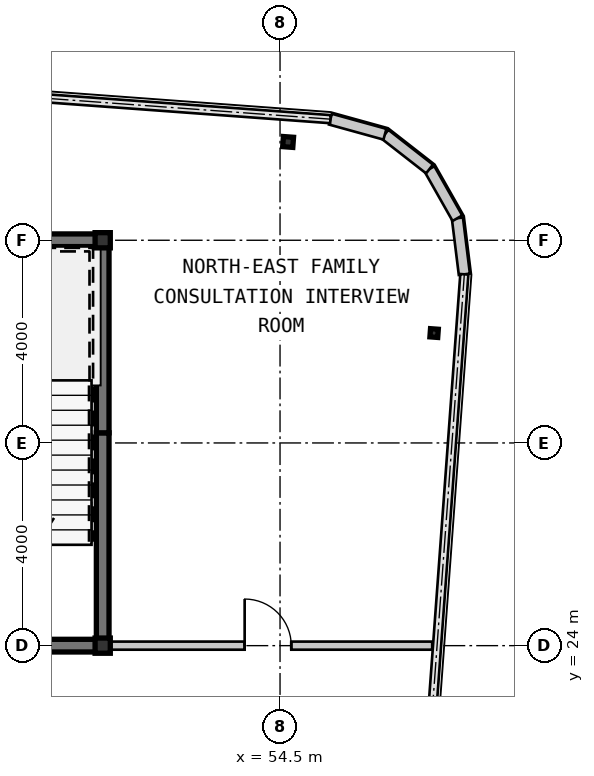
"""IFC4 building model, lengths in metres.
Left out: names, types, materials, properties, quantities, classifications, styles, units other than length and angle.
Written with IfcOpenShell. Run it as: python <this file> out.ifc"""

import sys

from ifc_helpers import new_model, si_unit, direction, frame, frame_2d, origin, origin_2d, place, context, subcontext, project, spatial, rectangle, hollow_rectangle, i_section, extrude, source, transform, mapped, element, fill, save


model = new_model("IFC4")
c1 = context("Model", 3, precision=1e-05, world=origin(), true_north=direction((0.0, 1.0)))
c2 = subcontext(c1, "Body", "Model", "MODEL_VIEW")
j1 = project(units=[si_unit("LENGTHUNIT", "METRE"), si_unit("PLANEANGLEUNIT", "RADIAN")], contexts=[c1])
p1 = place(None, origin())
s1 = spatial("IfcSite", under=j1, at=p1, CompositionType="ELEMENT")
p2 = place(p1, origin())
s2 = spatial("IfcBuilding", under=s1, at=p2, CompositionType="ELEMENT")
p3 = place(p2, frame((0.0, 0.0, 246.05)))
s3 = spatial("IfcBuildingStorey", under=s2, at=p3, CompositionType="ELEMENT", Elevation=246.05)
m1 = source(origin(), c2, "Body", "SweptSolid", [
    extrude(hollow_rectangle(XDim=0.3, YDim=0.3, WallThickness=0.012, at=origin_2d()), origin(), (0.0, 0.0, 1.0), 3.15),
])
for number, where, z_axis, x_axis in (
    (1, (51.0, 24.0, 0.0), (0.0, 0.0, 1.0), (1.0, 0.0, 0.0)),
    (2, (51.0, 32.0, 0.0), (0.0, 0.0, 1.0), (1.0, 0.0, 0.0)),
):
    element("IfcColumn", number, at=place(p3, frame(where, z_axis=z_axis, x_axis=x_axis)), inside=s3, PredefinedType="COLUMN", context=c2, shape_type="MappedRepresentation", body=[
        mapped(m1, transform((0.0, 0.0, 0.0), scale=1.0)),
    ])
m2 = source(origin(), c2, "Body", "SweptSolid", [
    extrude(hollow_rectangle(XDim=0.2, YDim=0.2, WallThickness=0.009, at=origin_2d()), origin(), (0.0, 0.0, 1.0), 3.15),
])
p4 = place(p3, frame((54.659, 33.94, 0.0), z_axis=(0.0, 0.0, 1.0), x_axis=(0.997314477224, -0.073238197128, 0.0)))
e3 = element("IfcColumn", 3, at=p4, inside=s3, PredefinedType="COLUMN", context=c2, shape_type="MappedRepresentation", body=[
    mapped(m2, transform((0.0, 0.0, 0.0), scale=1.0)),
])
m3 = source(origin(), c2, "Body", "SweptSolid", [
    extrude(i_section(OverallWidth=0.154, OverallDepth=0.162, WebThickness=0.008, FlangeThickness=0.011, at=origin_2d()), origin(), (0.0, 0.0, 1.0), 3.15),
])
p5 = place(p3, frame((57.541, 30.169, 0.0), z_axis=(0.0, 0.0, 1.0), x_axis=(0.997314477224, -0.073238197128, 0.0)))
e4 = element("IfcColumn", 4, at=p5, inside=s3, PredefinedType="COLUMN", context=c2, shape_type="MappedRepresentation", body=[
    mapped(m3, transform((0.0, 0.0, 0.0), scale=1.0)),
])
m4 = source(origin(), c2, "Body", "SweptSolid", [
    extrude(rectangle(XDim=1.116, YDim=0.22, at=frame_2d((0.558, 0.0))), origin(), (0.0, 0.0, 1.0), 2.93),
])
p6 = place(p3, frame((58.137, 31.328, 0.0), z_axis=(0.0, 0.0, 1.0), x_axis=(-0.122742076028, 0.992438604032, 0.0)))
e5 = element("IfcWall", 5, at=p6, inside=s3, PredefinedType="SOLIDWALL", context=c2, shape_type="MappedRepresentation", body=[
    mapped(m4, transform((0.0, 0.0, 0.0), scale=1.0)),
])
m5 = source(origin(), c2, "Body", "SweptSolid", [
    extrude(rectangle(XDim=1.116, YDim=0.22, at=frame_2d((0.558, 0.0))), origin(), (0.0, 0.0, 1.0), 2.93),
])
p7 = place(p3, frame((58.0, 32.436, 0.0), z_axis=(0.0, 0.0, 1.0), x_axis=(-0.493167138628, 0.869934579941, 0.0)))
e6 = element("IfcWall", 6, at=p7, inside=s3, PredefinedType="SOLIDWALL", context=c2, shape_type="MappedRepresentation", body=[
    mapped(m5, transform((0.0, 0.0, 0.0), scale=1.0)),
])
p8 = place(p3, frame((57.45, 33.406, 0.0), z_axis=(0.0, 0.0, 1.0), x_axis=(-0.788597772321, 0.614909386406, 0.0)))
e7 = element("IfcWall", 7, at=p8, inside=s3, PredefinedType="SOLIDWALL", context=c2, shape_type="MappedRepresentation", body=[
    mapped(m4, transform((0.0, 0.0, 0.0), scale=1.0)),
])
p9 = place(p3, frame((56.57, 34.093, 0.0), z_axis=(0.0, 0.0, 1.0), x_axis=(-0.963833843713, 0.266503886865, 0.0)))
e8 = element("IfcWall", 8, at=p9, inside=s3, PredefinedType="SOLIDWALL", context=c2, shape_type="MappedRepresentation", body=[
    mapped(m5, transform((0.0, 0.0, 0.0), scale=1.0)),
])
m6 = source(origin(), c2, "Body", "SweptSolid", [
    extrude(rectangle(XDim=11.925, YDim=0.25, at=frame_2d((5.962, 0.0))), origin(), (0.0, 0.0, 1.0), 2.93),
])
p10 = place(p3, frame((39.2, 32.0, 0.0), z_axis=(0.0, 0.0, 1.0), x_axis=(1.0, 0.0, 0.0)))
e9 = element("IfcWall", 9, at=p10, inside=s3, PredefinedType="SHEAR", context=c2, shape_type="MappedRepresentation", body=[
    mapped(m6, transform((0.0, 0.0, 0.0), scale=1.0)),
])
m7 = source(origin(), c2, "Body", "SweptSolid", [
    extrude(rectangle(XDim=4.075, YDim=0.25, at=frame_2d((2.038, 0.0))), origin(), (0.0, 0.0, 1.0), 2.93),
])
p11 = place(p3, frame((51.0, 24.125, 0.0), z_axis=(0.0, 0.0, 1.0), x_axis=(0.0, 1.0, 0.0)))
e10 = element("IfcWall", 10, at=p11, inside=s3, PredefinedType="SHEAR", context=c2, shape_type="MappedRepresentation", body=[
    mapped(m7, transform((0.0, 0.0, 0.0), scale=1.0)),
])
m8 = source(origin(), c2, "Body", "SweptSolid", [
    extrude(rectangle(XDim=3.675, YDim=0.25, at=frame_2d((1.837, 0.0))), origin(), (0.0, 0.0, 1.0), 2.93),
])
p12 = place(p3, frame((51.0, 28.2, 0.0), z_axis=(0.0, 0.0, 1.0), x_axis=(0.0, 1.0, 0.0)))
e11 = element("IfcWall", 11, at=p12, inside=s3, PredefinedType="SHEAR", context=c2, shape_type="MappedRepresentation", body=[
    mapped(m8, transform((0.0, 0.0, 0.0), scale=1.0)),
])
m9 = source(origin(), c2, "Body", "SweptSolid", [
    extrude(rectangle(XDim=4.85, YDim=0.25, at=frame_2d((2.425, 0.0))), origin(), (0.0, 0.0, 1.0), 2.93),
])
p13 = place(p3, frame((46.275, 24.0, 0.0), z_axis=(0.0, 0.0, 1.0), x_axis=(1.0, 0.0, 0.0)))
e12 = element("IfcWall", 12, at=p13, inside=s3, PredefinedType="SHEAR", context=c2, shape_type="MappedRepresentation", body=[
    mapped(m9, transform((0.0, 0.0, 0.0), scale=1.0)),
])
m10 = source(origin(), c2, "Body", "SweptSolid", [
    extrude(rectangle(XDim=6.378, YDim=0.16, at=frame_2d((3.189, 0.0))), origin(), (0.0, 0.0, 1.0), 2.93),
])
p14 = place(p3, frame((51.125, 24.0, 0.0), z_axis=(0.0, 0.0, 1.0), x_axis=(1.0, 0.0, 0.0)))
e13 = element("IfcWall", 13, at=p14, inside=s3, PredefinedType="PARTITIONING", context=c2, shape_type="MappedRepresentation", body=[
    mapped(m10, transform((0.0, 0.0, 0.0), scale=1.0)),
])
m11 = source(origin(), c2, "Body", "SweptSolid", [
    extrude(rectangle(XDim=0.92, YDim=2.1, at=frame_2d((0.46, 1.05))), frame((0.0, 0.09, 0.0), z_axis=(0.0, -1.0, 0.0), x_axis=(1.0, 0.0, 0.0)), (0.0, 0.0, 1.0), 0.18),
])
p15 = place(p14, frame((2.677, 0.0, 0.0)))
e14 = element("IfcOpeningElement", 14, at=p15, cuts=e13, PredefinedType="OPENING", context=c2, shape_type="MappedRepresentation", body=[
    mapped(m11, transform((0.0, 0.0, 0.0), scale=1.0)),
])
m12 = source(origin(), c2, "Body", "SweptSolid", [
    extrude(rectangle(XDim=0.92, YDim=2.1, at=frame_2d((0.46, 1.05))), frame((0.0, 0.025, 0.0), z_axis=(0.0, -1.0, 0.0), x_axis=(1.0, 0.0, 0.0)), (0.0, 0.0, 1.0), 0.05),
])
p16 = place(p15, origin())
e15 = element("IfcDoor", 15, at=p16, inside=s3, OperationType="SINGLE_SWING_LEFT", PredefinedType="DOOR", context=c2, shape_type="MappedRepresentation", body=[
    mapped(m12, transform((0.0, 0.0, 0.0), scale=1.0)),
])
fill(e14, e15)
save(model, sys.argv[1])
